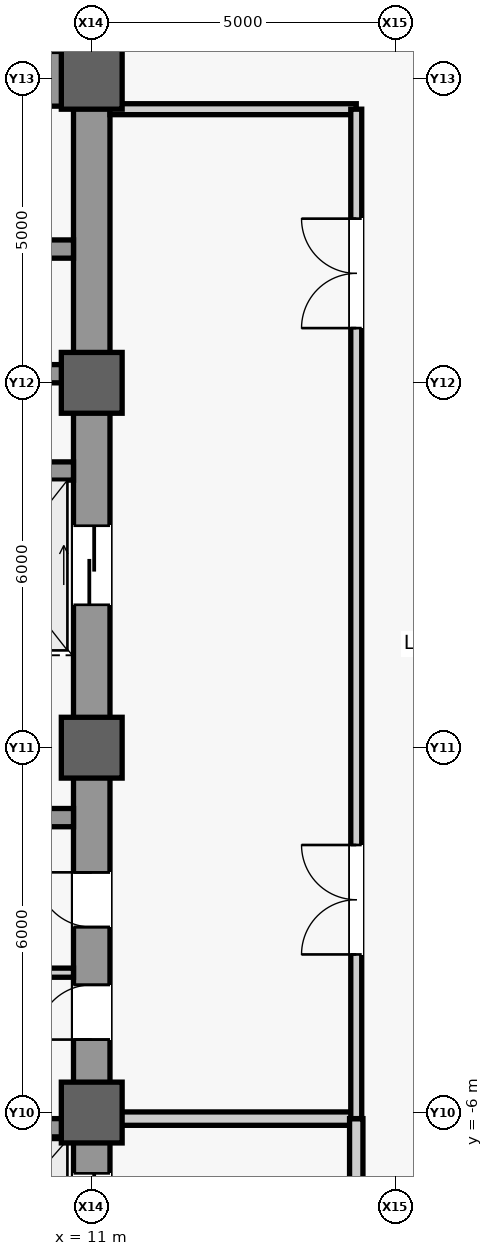
"""IFC4 building model, lengths in metres.
Left out: names, types, materials, properties, quantities, classifications, styles, units other than length and angle.
Written with IfcOpenShell. Run it as: python <this file> out.ifc"""

import sys

from ifc_helpers import new_model, si_unit, direction, frame, frame_2d, origin, origin_2d, place, context, subcontext, project, spatial, rectangle, extrude, source, transform, mapped, element, fill, save


model = new_model("IFC4")
c1 = context("Model", 3, precision=1e-05, world=origin(), true_north=direction((0.0, 1.0)))
c2 = subcontext(c1, "Body", "Model", "MODEL_VIEW")
j1 = project(units=[si_unit("LENGTHUNIT", "METRE"), si_unit("PLANEANGLEUNIT", "RADIAN")], contexts=[c1])
p1 = place(None, origin())
s1 = spatial("IfcSite", under=j1, at=p1, CompositionType="ELEMENT")
p2 = place(p1, origin())
s2 = spatial("IfcBuilding", under=s1, at=p2, CompositionType="ELEMENT")
p3 = place(p2, frame((0.0, 0.0, 83.0)))
s3 = spatial("IfcBuildingStorey", under=s2, at=p3, CompositionType="ELEMENT", Elevation=83.0)
m1 = source(origin(), c2, "Body", "SweptSolid", [
    extrude(rectangle(XDim=22.0, YDim=0.6, at=frame_2d((11.0, 0.0))), origin(), (0.0, 0.0, 1.0), 3.94),
])
p4 = place(p3, frame((11.0, -11.0, 0.0), z_axis=(0.0, 0.0, 1.0), x_axis=(0.0, 1.0, 0.0)))
e1 = element("IfcWall", 1, at=p4, inside=s3, PredefinedType="SHEAR", context=c2, shape_type="MappedRepresentation", body=[
    mapped(m1, transform((0.0, 0.0, 0.0), scale=1.0)),
])
m2 = source(origin(), c2, "Body", "SweptSolid", [
    extrude(rectangle(XDim=1.1, YDim=2.2, at=frame_2d((0.55, 1.1))), frame((0.0, 0.31, 0.0), z_axis=(0.0, -1.0, 0.0), x_axis=(1.0, 0.0, 0.0)), (0.0, 0.0, 1.0), 0.62),
])
p5 = place(p4, frame((0.8, 0.0, 0.0)))
e2 = element("IfcOpeningElement", 2, at=p5, cuts=e1, PredefinedType="OPENING", context=c2, shape_type="MappedRepresentation", body=[
    mapped(m2, transform((0.0, 0.0, 0.0), scale=1.0)),
])
m3 = source(origin(), c2, "Body", "SweptSolid", [
    extrude(rectangle(XDim=0.9, YDim=2.15, at=frame_2d((0.45, 1.075))), frame((0.0, 0.31, 0.0), z_axis=(0.0, -1.0, 0.0), x_axis=(1.0, 0.0, 0.0)), (0.0, 0.0, 1.0), 0.62),
])
p6 = place(p4, frame((6.2, 0.0, 0.0)))
e3 = element("IfcOpeningElement", 3, at=p6, cuts=e1, PredefinedType="OPENING", context=c2, shape_type="MappedRepresentation", body=[
    mapped(m3, transform((0.0, 0.0, 0.0), scale=1.0)),
])
p7 = place(p4, frame((8.05, 0.0, 0.0)))
e4 = element("IfcOpeningElement", 4, at=p7, cuts=e1, PredefinedType="OPENING", context=c2, shape_type="MappedRepresentation", body=[
    mapped(m3, transform((0.0, 0.0, 0.0), scale=1.0)),
])
m4 = source(origin(), c2, "Body", "SweptSolid", [
    extrude(rectangle(XDim=1.3, YDim=2.3, at=frame_2d((0.65, 1.15))), frame((0.0, 0.31, 0.0), z_axis=(0.0, -1.0, 0.0), x_axis=(1.0, 0.0, 0.0)), (0.0, 0.0, 1.0), 0.62),
])
p8 = place(p4, frame((2.7, 0.0, 0.0)))
e5 = element("IfcOpeningElement", 5, at=p8, cuts=e1, PredefinedType="OPENING", context=c2, shape_type="MappedRepresentation", body=[
    mapped(m4, transform((0.0, 0.0, 0.0), scale=1.0)),
])
p9 = place(p4, frame((13.35, 0.0, 0.0)))
e6 = element("IfcOpeningElement", 6, at=p9, cuts=e1, PredefinedType="OPENING", context=c2, shape_type="MappedRepresentation", body=[
    mapped(m4, transform((0.0, 0.0, 0.0), scale=1.0)),
])
m5 = source(origin(), c2, "Body", "SweptSolid", [
    extrude(rectangle(XDim=5.85, YDim=0.9, at=frame_2d((2.925, 0.0))), origin(), (0.0, 0.0, 1.0), 3.94),
])
p10 = place(p3, frame((4.85, 11.0, 0.0), z_axis=(0.0, 0.0, 1.0), x_axis=(1.0, 0.0, 0.0)))
e7 = element("IfcWall", 7, at=p10, inside=s3, PredefinedType="SHEAR", context=c2, shape_type="MappedRepresentation", body=[
    mapped(m5, transform((0.0, 0.0, 0.0), scale=1.0)),
])
m6 = source(origin(), c2, "Body", "SweptSolid", [
    extrude(rectangle(XDim=1.05, YDim=2.2, at=frame_2d((0.525, 1.1))), frame((0.0, 0.46, 0.0), z_axis=(0.0, -1.0, 0.0), x_axis=(1.0, 0.0, 0.0)), (0.0, 0.0, 1.0), 0.92),
])
p11 = place(p10, frame((1.375, 0.0, 0.0)))
e8 = element("IfcOpeningElement", 8, at=p11, cuts=e7, PredefinedType="OPENING", context=c2, shape_type="MappedRepresentation", body=[
    mapped(m6, transform((0.0, 0.0, 0.0), scale=1.0)),
])
m7 = source(origin(), c2, "Body", "SweptSolid", [
    extrude(rectangle(XDim=5.6, YDim=0.3, at=frame_2d((2.8, 0.0))), origin(), (0.0, 0.0, 1.0), 3.94),
])
p12 = place(p3, frame((5.1, -1.15, 0.0), z_axis=(0.0, 0.0, 1.0), x_axis=(1.0, 0.0, 0.0)))
e9 = element("IfcWall", 9, at=p12, inside=s3, PredefinedType="SHEAR", context=c2, shape_type="MappedRepresentation", body=[
    mapped(m7, transform((0.0, 0.0, 0.0), scale=1.0)),
])
m8 = source(origin(), c2, "Body", "SweptSolid", [
    extrude(rectangle(XDim=1.0, YDim=1.0, at=origin_2d()), origin(), (0.0, 0.0, 1.0), 4.2),
])
for number, where, z_axis, x_axis in (
    (10, (11.0, -6.0, 0.0), (0.0, 0.0, 1.0), (1.0, 0.0, 0.0)),
    (11, (11.0, 0.0, 0.0), (0.0, 0.0, 1.0), (1.0, 0.0, 0.0)),
    (12, (11.0, 6.0, 0.0), (0.0, 0.0, 1.0), (1.0, 0.0, 0.0)),
    (13, (11.0, 11.0, 0.0), (0.0, 0.0, 1.0), (1.0, 0.0, 0.0)),
):
    element("IfcColumn", number, at=place(p3, frame(where, z_axis=z_axis, x_axis=x_axis)), inside=s3, PredefinedType="COLUMN", context=c2, shape_type="MappedRepresentation", body=[
        mapped(m8, transform((0.0, 0.0, 0.0), scale=1.0)),
    ])
m9 = source(origin(), c2, "Body", "SweptSolid", [
    extrude(rectangle(XDim=2.2, YDim=0.3, at=frame_2d((1.1, 0.0))), origin(), (0.0, 0.0, 1.0), 3.94),
])
p13 = place(p3, frame((8.5, -6.25, 0.0), z_axis=(0.0, 0.0, 1.0), x_axis=(1.0, 0.0, 0.0)))
e14 = element("IfcWall", 14, at=p13, inside=s3, PredefinedType="SHEAR", context=c2, shape_type="MappedRepresentation", body=[
    mapped(m9, transform((0.0, 0.0, 0.0), scale=1.0)),
])
m10 = source(origin(), c2, "Body", "SweptSolid", [
    extrude(rectangle(XDim=2.3, YDim=0.3, at=frame_2d((1.15, 0.0))), origin(), (0.0, 0.0, 1.0), 3.94),
])
for number, where, z_axis, x_axis in (
    (15, (8.4, 4.55, 0.0), (0.0, 0.0, 1.0), (1.0, 0.0, 0.0)),
    (16, (8.4, 6.15, 0.0), (0.0, 0.0, 1.0), (1.0, 0.0, 0.0)),
    (17, (8.4, 8.2, 0.0), (0.0, 0.0, 1.0), (1.0, 0.0, 0.0)),
):
    element("IfcWall", number, at=place(p3, frame(where, z_axis=z_axis, x_axis=x_axis)), inside=s3, PredefinedType="SHEAR", context=c2, shape_type="MappedRepresentation", body=[
        mapped(m10, transform((0.0, 0.0, 0.0), scale=1.0)),
    ])
m11 = source(origin(), c2, "Body", "SweptSolid", [
    extrude(rectangle(XDim=2.05, YDim=0.15, at=frame_2d((1.025, 0.0))), origin(), (0.0, 0.0, 1.0), 3.94),
])
p14 = place(p3, frame((8.65, -3.7, 0.0), z_axis=(0.0, 0.0, 1.0), x_axis=(1.0, 0.0, 0.0)))
e18 = element("IfcWall", 18, at=p14, inside=s3, PredefinedType="PARTITIONING", context=c2, shape_type="MappedRepresentation", body=[
    mapped(m11, transform((0.0, 0.0, 0.0), scale=1.0)),
])
m12 = source(origin(), c2, "Body", "SweptSolid", [
    extrude(rectangle(XDim=4.05, YDim=0.22, at=frame_2d((2.025, 0.0))), origin(), (0.0, 0.0, 1.0), 3.085),
])
p15 = place(p3, frame((11.3, -6.1, 0.0), z_axis=(0.0, 0.0, 1.0), x_axis=(1.0, 0.0, 0.0)))
e19 = element("IfcWall", 19, at=p15, inside=s3, PredefinedType="PARTITIONING", context=c2, shape_type="MappedRepresentation", body=[
    mapped(m12, transform((0.0, 0.0, 0.0), scale=1.0)),
])
m13 = source(origin(), c2, "Body", "SweptSolid", [
    extrude(rectangle(XDim=4.4, YDim=0.22, at=frame_2d((2.2, 0.0))), origin(), (0.0, 0.0, 1.0), 3.94),
])
p16 = place(p3, frame((15.35, -10.5, 0.0), z_axis=(0.0, 0.0, 1.0), x_axis=(0.0, 1.0, 0.0)))
e20 = element("IfcWall", 20, at=p16, inside=s3, PredefinedType="PARTITIONING", context=c2, shape_type="MappedRepresentation", body=[
    mapped(m13, transform((0.0, 0.0, 0.0), scale=1.0)),
])
m14 = source(origin(), c2, "Body", "SweptSolid", [
    extrude(rectangle(XDim=1.2, YDim=2.2, at=frame_2d((0.6, 1.1))), frame((0.0, 0.12, 0.0), z_axis=(0.0, -1.0, 0.0), x_axis=(1.0, 0.0, 0.0)), (0.0, 0.0, 1.0), 0.24),
])
p17 = place(p16, frame((1.6, 0.0, 0.0)))
e21 = element("IfcOpeningElement", 21, at=p17, cuts=e20, PredefinedType="OPENING", context=c2, shape_type="MappedRepresentation", body=[
    mapped(m14, transform((0.0, 0.0, 0.0), scale=1.0)),
])
m15 = source(origin(), c2, "Body", "SweptSolid", [
    extrude(rectangle(XDim=4.05, YDim=0.18, at=frame_2d((2.025, 0.0))), origin(), (0.0, 0.0, 1.0), 3.94),
])
p18 = place(p3, frame((11.3, 10.5, 0.0), z_axis=(0.0, 0.0, 1.0), x_axis=(1.0, 0.0, 0.0)))
e22 = element("IfcWall", 22, at=p18, inside=s3, PredefinedType="PARTITIONING", context=c2, shape_type="MappedRepresentation", body=[
    mapped(m15, transform((0.0, 0.0, 0.0), scale=1.0)),
])
m16 = source(origin(), c2, "Body", "SweptSolid", [
    extrude(rectangle(XDim=16.6, YDim=0.18, at=frame_2d((8.3, 0.0))), origin(), (0.0, 0.0, 1.0), 3.94),
])
p19 = place(p3, frame((15.35, -6.1, 0.0), z_axis=(0.0, 0.0, 1.0), x_axis=(0.0, 1.0, 0.0)))
e23 = element("IfcWall", 23, at=p19, inside=s3, PredefinedType="PARTITIONING", context=c2, shape_type="MappedRepresentation", body=[
    mapped(m16, transform((0.0, 0.0, 0.0), scale=1.0)),
])
m17 = source(origin(), c2, "Body", "SweptSolid", [
    extrude(rectangle(XDim=1.8, YDim=2.25, at=frame_2d((0.9, 1.125))), frame((0.0, 0.1, 0.0), z_axis=(0.0, -1.0, 0.0), x_axis=(1.0, 0.0, 0.0)), (0.0, 0.0, 1.0), 0.2),
])
p20 = place(p19, frame((2.7, 0.0, 0.0)))
e24 = element("IfcOpeningElement", 24, at=p20, cuts=e23, PredefinedType="OPENING", context=c2, shape_type="MappedRepresentation", body=[
    mapped(m17, transform((0.0, 0.0, 0.0), scale=1.0)),
])
p21 = place(p19, frame((13.0, 0.0, 0.0)))
e25 = element("IfcOpeningElement", 25, at=p21, cuts=e23, PredefinedType="OPENING", context=c2, shape_type="MappedRepresentation", body=[
    mapped(m17, transform((0.0, 0.0, 0.0), scale=1.0)),
])
m18 = source(origin(), c2, "Body", "SweptSolid", [
    extrude(rectangle(XDim=0.9, YDim=2.15, at=frame_2d((0.45, 1.075))), frame((0.0, 0.025, 0.0), z_axis=(0.0, -1.0, 0.0), x_axis=(1.0, 0.0, 0.0)), (0.0, 0.0, 1.0), 0.05),
])
p22 = place(p6, origin())
e26 = element("IfcDoor", 26, at=p22, inside=s3, OperationType="SINGLE_SWING_LEFT", PredefinedType="DOOR", context=c2, shape_type="MappedRepresentation", body=[
    mapped(m18, transform((0.0, 0.0, 0.0), scale=1.0)),
])
fill(e3, e26)
p23 = place(p7, origin())
e27 = element("IfcDoor", 27, at=p23, inside=s3, OperationType="SINGLE_SWING_RIGHT", PredefinedType="DOOR", context=c2, shape_type="MappedRepresentation", body=[
    mapped(m18, transform((0.0, 0.0, 0.0), scale=1.0)),
])
fill(e4, e27)
m19 = source(origin(), c2, "Body", "SweptSolid", [
    extrude(rectangle(XDim=1.8, YDim=2.25, at=frame_2d((0.9, 1.125))), frame((0.0, 0.025, 0.0), z_axis=(0.0, -1.0, 0.0), x_axis=(1.0, 0.0, 0.0)), (0.0, 0.0, 1.0), 0.05),
])
p24 = place(p20, origin())
e28 = element("IfcDoor", 28, at=p24, inside=s3, OperationType="SINGLE_SWING_RIGHT", PredefinedType="DOOR", context=c2, shape_type="MappedRepresentation", body=[
    mapped(m19, transform((0.0, 0.0, 0.0), scale=1.0)),
])
fill(e24, e28)
p25 = place(p21, origin())
e29 = element("IfcDoor", 29, at=p25, inside=s3, OperationType="SINGLE_SWING_LEFT", PredefinedType="DOOR", context=c2, shape_type="MappedRepresentation", body=[
    mapped(m19, transform((0.0, 0.0, 0.0), scale=1.0)),
])
fill(e25, e29)
m20 = source(origin(), c2, "Body", "SweptSolid", [
    extrude(rectangle(XDim=1.3, YDim=2.3, at=frame_2d((0.65, 1.15))), frame((0.0, 0.025, 0.0), z_axis=(0.0, -1.0, 0.0), x_axis=(1.0, 0.0, 0.0)), (0.0, 0.0, 1.0), 0.05),
])
p26 = place(p8, origin())
e30 = element("IfcDoor", 30, at=p26, inside=s3, OperationType="SLIDING_TO_LEFT", PredefinedType="DOOR", context=c2, shape_type="MappedRepresentation", body=[
    mapped(m20, transform((0.0, 0.0, 0.0), scale=1.0)),
])
fill(e5, e30)
p27 = place(p9, origin())
e31 = element("IfcDoor", 31, at=p27, inside=s3, OperationType="SLIDING_TO_LEFT", PredefinedType="DOOR", context=c2, shape_type="MappedRepresentation", body=[
    mapped(m20, transform((0.0, 0.0, 0.0), scale=1.0)),
])
fill(e6, e31)
save(model, sys.argv[1])
